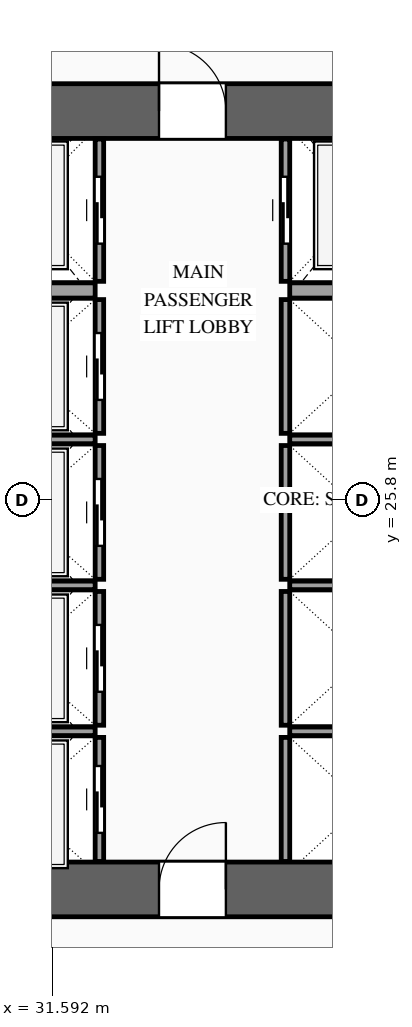
"""IFC4 building model, lengths in metres.
Left out: names, types, materials, properties, quantities, classifications, styles, units other than length and angle.
Written with IfcOpenShell. Run it as: python <this file> out.ifc"""

import sys

from ifc_helpers import new_model, si_unit, direction, frame, frame_2d, origin, place, context, subcontext, project, spatial, rectangle, extrude, source, transform, mapped, element, fill, save


model = new_model("IFC4")
c1 = context("Model", 3, precision=1e-05, world=origin(), true_north=direction((0.0, 1.0)))
c2 = subcontext(c1, "Body", "Model", "MODEL_VIEW")
j1 = project(units=[si_unit("LENGTHUNIT", "METRE"), si_unit("PLANEANGLEUNIT", "RADIAN")], contexts=[c1])
p1 = place(None, origin())
s1 = spatial("IfcSite", under=j1, at=p1, CompositionType="ELEMENT")
p2 = place(p1, origin())
s2 = spatial("IfcBuilding", under=s1, at=p2, CompositionType="ELEMENT")
p3 = place(p2, frame((0.0, 0.0, 64.0)))
s3 = spatial("IfcBuildingStorey", under=s2, at=p3, CompositionType="ELEMENT", Elevation=64.0)
p4 = place(p3, frame((23.35, 19.4, 0.0), z_axis=(0.0, 0.0, 1.0), x_axis=(1.0, 0.0, 0.0)))
e1 = element("IfcWall", 1, at=p4, inside=s3, PredefinedType="SHEAR", context=c2, shape_type="SweptSolid", body=[
    extrude(rectangle(XDim=27.3, YDim=0.9, at=frame_2d((13.65, 0.0))), origin(), (0.0, 0.0, 1.0), 3.6),
])
p5 = place(p4, frame((2.1, 0.0, 0.0)))
e2 = element("IfcOpeningElement", 2, at=p5, cuts=e1, PredefinedType="OPENING", context=c2, shape_type="SweptSolid", body=[
    extrude(rectangle(XDim=1.1, YDim=2.2, at=frame_2d((0.55, 1.1))), frame((0.0, 0.465, 0.0), z_axis=(0.0, -1.0, 0.0), x_axis=(1.0, 0.0, 0.0)), (0.0, 0.0, 1.0), 0.93),
])
p6 = place(p4, frame((10.0, 0.0, 0.0)))
e3 = element("IfcOpeningElement", 3, at=p6, cuts=e1, PredefinedType="OPENING", context=c2, shape_type="SweptSolid", body=[
    extrude(rectangle(XDim=1.1, YDim=2.2, at=frame_2d((0.55, 1.1))), frame((0.0, 0.465, 0.0), z_axis=(0.0, -1.0, 0.0), x_axis=(1.0, 0.0, 0.0)), (0.0, 0.0, 1.0), 0.93),
])
p7 = place(p4, frame((23.2, 0.0, 0.0)))
e4 = element("IfcOpeningElement", 4, at=p7, cuts=e1, PredefinedType="OPENING", context=c2, shape_type="SweptSolid", body=[
    extrude(rectangle(XDim=1.1, YDim=2.2, at=frame_2d((0.55, 1.1))), frame((0.0, 0.465, 0.0), z_axis=(0.0, -1.0, 0.0), x_axis=(1.0, 0.0, 0.0)), (0.0, 0.0, 1.0), 0.93),
])
p8 = place(p4, frame((19.82, 0.0, 0.0)))
e5 = element("IfcOpeningElement", 5, at=p8, cuts=e1, PredefinedType="OPENING", context=c2, shape_type="SweptSolid", body=[
    extrude(rectangle(XDim=0.9, YDim=2.15, at=frame_2d((0.45, 1.075))), frame((0.0, 0.465, 0.0), z_axis=(0.0, -1.0, 0.0), x_axis=(1.0, 0.0, 0.0)), (0.0, 0.0, 1.0), 0.93),
])
p9 = place(p4, frame((18.38, 0.0, 0.0)))
e6 = element("IfcOpeningElement", 6, at=p9, cuts=e1, PredefinedType="OPENING", context=c2, shape_type="SweptSolid", body=[
    extrude(rectangle(XDim=0.9, YDim=2.15, at=frame_2d((0.45, 1.075))), frame((0.0, 0.465, 0.0), z_axis=(0.0, -1.0, 0.0), x_axis=(1.0, 0.0, 0.0)), (0.0, 0.0, 1.0), 0.93),
])
p10 = place(p3, frame((23.35, 32.2, 0.0), z_axis=(0.0, 0.0, 1.0), x_axis=(1.0, 0.0, 0.0)))
e7 = element("IfcWall", 7, at=p10, inside=s3, PredefinedType="SHEAR", context=c2, shape_type="SweptSolid", body=[
    extrude(rectangle(XDim=27.3, YDim=0.9, at=frame_2d((13.65, 0.0))), origin(), (0.0, 0.0, 1.0), 3.6),
])
p11 = place(p10, frame((4.72, 0.0, 0.0)))
e8 = element("IfcOpeningElement", 8, at=p11, cuts=e7, PredefinedType="OPENING", context=c2, shape_type="SweptSolid", body=[
    extrude(rectangle(XDim=0.9, YDim=2.15, at=frame_2d((0.45, 1.075))), frame((0.0, 0.465, 0.0), z_axis=(0.0, -1.0, 0.0), x_axis=(1.0, 0.0, 0.0)), (0.0, 0.0, 1.0), 0.93),
])
p12 = place(p10, frame((10.0, 0.0, 0.0)))
e9 = element("IfcOpeningElement", 9, at=p12, cuts=e7, PredefinedType="OPENING", context=c2, shape_type="SweptSolid", body=[
    extrude(rectangle(XDim=1.1, YDim=2.2, at=frame_2d((0.55, 1.1))), frame((0.0, 0.465, 0.0), z_axis=(0.0, -1.0, 0.0), x_axis=(1.0, 0.0, 0.0)), (0.0, 0.0, 1.0), 0.93),
])
p13 = place(p10, frame((15.85, 0.0, 0.0)))
e10 = element("IfcOpeningElement", 10, at=p13, cuts=e7, PredefinedType="OPENING", context=c2, shape_type="SweptSolid", body=[
    extrude(rectangle(XDim=1.1, YDim=2.2, at=frame_2d((0.55, 1.1))), frame((0.0, 0.465, 0.0), z_axis=(0.0, -1.0, 0.0), x_axis=(1.0, 0.0, 0.0)), (0.0, 0.0, 1.0), 0.93),
])
p14 = place(p10, frame((19.82, 0.0, 0.0)))
e11 = element("IfcOpeningElement", 11, at=p14, cuts=e7, PredefinedType="OPENING", context=c2, shape_type="SweptSolid", body=[
    extrude(rectangle(XDim=0.9, YDim=2.15, at=frame_2d((0.45, 1.075))), frame((0.0, 0.465, 0.0), z_axis=(0.0, -1.0, 0.0), x_axis=(1.0, 0.0, 0.0)), (0.0, 0.0, 1.0), 0.93),
])
p15 = place(p3, frame((32.37, 19.86, 0.0), z_axis=(0.0, 0.0, 1.0), x_axis=(0.0, 1.0, 0.0)))
e12 = element("IfcWall", 12, at=p15, inside=s3, PredefinedType="SOLIDWALL", context=c2, shape_type="SweptSolid", body=[
    extrude(rectangle(XDim=2.04, YDim=0.14, at=frame_2d((1.02, 0.0))), origin(), (0.0, 0.0, 1.0), 3.38),
])
p16 = place(p15, frame((0.47, 0.0, 0.0)))
e13 = element("IfcOpeningElement", 13, at=p16, cuts=e12, PredefinedType="OPENING", context=c2, shape_type="SweptSolid", body=[
    extrude(rectangle(XDim=1.1, YDim=2.2, at=frame_2d((0.55, 1.1))), frame((0.0, 0.085, 0.0), z_axis=(0.0, -1.0, 0.0), x_axis=(1.0, 0.0, 0.0)), (0.0, 0.0, 1.0), 0.17),
])
m1 = source(origin(), c2, "Body", "SweptSolid", [
    extrude(rectangle(XDim=2.5, YDim=0.14, at=frame_2d((1.25, 0.0))), origin(), (0.0, 0.0, 1.0), 3.38),
])
p17 = place(p3, frame((29.8, 22.0, 0.0), z_axis=(0.0, 0.0, 1.0), x_axis=(1.0, 0.0, 0.0)))
e14 = element("IfcWall", 14, at=p17, inside=s3, PredefinedType="SOLIDWALL", context=c2, shape_type="MappedRepresentation", body=[
    mapped(m1, transform((0.0, 0.0, 0.0), scale=1.0)),
])
p18 = place(p3, frame((32.37, 22.1, 0.0), z_axis=(0.0, 0.0, 1.0), x_axis=(0.0, 1.0, 0.0)))
e15 = element("IfcWall", 15, at=p18, inside=s3, PredefinedType="SOLIDWALL", context=c2, shape_type="SweptSolid", body=[
    extrude(rectangle(XDim=2.2, YDim=0.14, at=frame_2d((1.1, 0.0))), origin(), (0.0, 0.0, 1.0), 3.38),
])
p19 = place(p18, frame((0.55, 0.0, 0.0)))
e16 = element("IfcOpeningElement", 16, at=p19, cuts=e15, PredefinedType="OPENING", context=c2, shape_type="SweptSolid", body=[
    extrude(rectangle(XDim=1.1, YDim=2.2, at=frame_2d((0.55, 1.1))), frame((0.0, 0.085, 0.0), z_axis=(0.0, -1.0, 0.0), x_axis=(1.0, 0.0, 0.0)), (0.0, 0.0, 1.0), 0.17),
])
p20 = place(p3, frame((29.8, 24.4, 0.0), z_axis=(0.0, 0.0, 1.0), x_axis=(1.0, 0.0, 0.0)))
e17 = element("IfcWall", 17, at=p20, inside=s3, PredefinedType="SOLIDWALL", context=c2, shape_type="MappedRepresentation", body=[
    mapped(m1, transform((0.0, 0.0, 0.0), scale=1.0)),
])
p21 = place(p3, frame((32.37, 24.5, 0.0), z_axis=(0.0, 0.0, 1.0), x_axis=(0.0, 1.0, 0.0)))
e18 = element("IfcWall", 18, at=p21, inside=s3, PredefinedType="SOLIDWALL", context=c2, shape_type="SweptSolid", body=[
    extrude(rectangle(XDim=2.2, YDim=0.14, at=frame_2d((1.1, 0.0))), origin(), (0.0, 0.0, 1.0), 3.38),
])
p22 = place(p21, frame((0.55, 0.0, 0.0)))
e19 = element("IfcOpeningElement", 19, at=p22, cuts=e18, PredefinedType="OPENING", context=c2, shape_type="SweptSolid", body=[
    extrude(rectangle(XDim=1.1, YDim=2.2, at=frame_2d((0.55, 1.1))), frame((0.0, 0.085, 0.0), z_axis=(0.0, -1.0, 0.0), x_axis=(1.0, 0.0, 0.0)), (0.0, 0.0, 1.0), 0.17),
])
p23 = place(p3, frame((29.8, 26.8, 0.0), z_axis=(0.0, 0.0, 1.0), x_axis=(1.0, 0.0, 0.0)))
e20 = element("IfcWall", 20, at=p23, inside=s3, PredefinedType="SOLIDWALL", context=c2, shape_type="MappedRepresentation", body=[
    mapped(m1, transform((0.0, 0.0, 0.0), scale=1.0)),
])
p24 = place(p3, frame((32.37, 26.9, 0.0), z_axis=(0.0, 0.0, 1.0), x_axis=(0.0, 1.0, 0.0)))
e21 = element("IfcWall", 21, at=p24, inside=s3, PredefinedType="SOLIDWALL", context=c2, shape_type="SweptSolid", body=[
    extrude(rectangle(XDim=2.2, YDim=0.14, at=frame_2d((1.1, 0.0))), origin(), (0.0, 0.0, 1.0), 3.38),
])
p25 = place(p24, frame((0.55, 0.0, 0.0)))
e22 = element("IfcOpeningElement", 22, at=p25, cuts=e21, PredefinedType="OPENING", context=c2, shape_type="SweptSolid", body=[
    extrude(rectangle(XDim=1.1, YDim=2.2, at=frame_2d((0.55, 1.1))), frame((0.0, 0.085, 0.0), z_axis=(0.0, -1.0, 0.0), x_axis=(1.0, 0.0, 0.0)), (0.0, 0.0, 1.0), 0.17),
])
p26 = place(p3, frame((32.37, 29.4, 0.0), z_axis=(0.0, 0.0, 1.0), x_axis=(0.0, 1.0, 0.0)))
e23 = element("IfcWall", 23, at=p26, inside=s3, PredefinedType="SOLIDWALL", context=c2, shape_type="SweptSolid", body=[
    extrude(rectangle(XDim=2.34, YDim=0.14, at=frame_2d((1.17, 0.0))), origin(), (0.0, 0.0, 1.0), 3.38),
])
p27 = place(p26, frame((0.62, 0.0, 0.0)))
e24 = element("IfcOpeningElement", 24, at=p27, cuts=e23, PredefinedType="OPENING", context=c2, shape_type="SweptSolid", body=[
    extrude(rectangle(XDim=1.1, YDim=2.2, at=frame_2d((0.55, 1.1))), frame((0.0, 0.085, 0.0), z_axis=(0.0, -1.0, 0.0), x_axis=(1.0, 0.0, 0.0)), (0.0, 0.0, 1.0), 0.17),
])
m2 = source(origin(), c2, "Body", "SweptSolid", [
    extrude(rectangle(XDim=2.5, YDim=0.25, at=frame_2d((1.25, 0.0))), origin(), (0.0, 0.0, 1.0), 3.38),
])
p28 = place(p3, frame((29.8, 29.25, 0.0), z_axis=(0.0, 0.0, 1.0), x_axis=(1.0, 0.0, 0.0)))
e25 = element("IfcWall", 25, at=p28, inside=s3, PredefinedType="SOLIDWALL", context=c2, shape_type="MappedRepresentation", body=[
    mapped(m2, transform((0.0, 0.0, 0.0), scale=1.0)),
])
m3 = source(origin(), c2, "Body", "SweptSolid", [
    extrude(rectangle(XDim=2.04, YDim=0.14, at=frame_2d((1.02, 0.0))), origin(), (0.0, 0.0, 1.0), 3.38),
])
p29 = place(p3, frame((35.43, 19.86, 0.0), z_axis=(0.0, 0.0, 1.0), x_axis=(0.0, 1.0, 0.0)))
e26 = element("IfcWall", 26, at=p29, inside=s3, PredefinedType="SOLIDWALL", context=c2, shape_type="MappedRepresentation", body=[
    mapped(m3, transform((0.0, 0.0, 0.0), scale=1.0)),
])
m4 = source(origin(), c2, "Body", "SweptSolid", [
    extrude(rectangle(XDim=2.4, YDim=0.14, at=frame_2d((1.2, 0.0))), origin(), (0.0, 0.0, 1.0), 3.38),
])
p30 = place(p3, frame((35.5, 22.0, 0.0), z_axis=(0.0, 0.0, 1.0), x_axis=(1.0, 0.0, 0.0)))
e27 = element("IfcWall", 27, at=p30, inside=s3, PredefinedType="SOLIDWALL", context=c2, shape_type="MappedRepresentation", body=[
    mapped(m4, transform((0.0, 0.0, 0.0), scale=1.0)),
])
m5 = source(origin(), c2, "Body", "SweptSolid", [
    extrude(rectangle(XDim=2.2, YDim=0.14, at=frame_2d((1.1, 0.0))), origin(), (0.0, 0.0, 1.0), 3.38),
])
p31 = place(p3, frame((35.43, 22.1, 0.0), z_axis=(0.0, 0.0, 1.0), x_axis=(0.0, 1.0, 0.0)))
e28 = element("IfcWall", 28, at=p31, inside=s3, PredefinedType="SOLIDWALL", context=c2, shape_type="MappedRepresentation", body=[
    mapped(m5, transform((0.0, 0.0, 0.0), scale=1.0)),
])
p32 = place(p3, frame((35.5, 24.4, 0.0), z_axis=(0.0, 0.0, 1.0), x_axis=(1.0, 0.0, 0.0)))
e29 = element("IfcWall", 29, at=p32, inside=s3, PredefinedType="SOLIDWALL", context=c2, shape_type="MappedRepresentation", body=[
    mapped(m4, transform((0.0, 0.0, 0.0), scale=1.0)),
])
p33 = place(p3, frame((35.43, 24.5, 0.0), z_axis=(0.0, 0.0, 1.0), x_axis=(0.0, 1.0, 0.0)))
e30 = element("IfcWall", 30, at=p33, inside=s3, PredefinedType="SOLIDWALL", context=c2, shape_type="MappedRepresentation", body=[
    mapped(m5, transform((0.0, 0.0, 0.0), scale=1.0)),
])
p34 = place(p3, frame((35.5, 26.8, 0.0), z_axis=(0.0, 0.0, 1.0), x_axis=(1.0, 0.0, 0.0)))
e31 = element("IfcWall", 31, at=p34, inside=s3, PredefinedType="SOLIDWALL", context=c2, shape_type="MappedRepresentation", body=[
    mapped(m4, transform((0.0, 0.0, 0.0), scale=1.0)),
])
m6 = source(origin(), c2, "Body", "SweptSolid", [
    extrude(rectangle(XDim=2.2, YDim=0.14, at=frame_2d((1.1, 0.0))), origin(), (0.0, 0.0, 1.0), 3.38),
])
p35 = place(p3, frame((35.43, 26.9, 0.0), z_axis=(0.0, 0.0, 1.0), x_axis=(0.0, 1.0, 0.0)))
e32 = element("IfcWall", 32, at=p35, inside=s3, PredefinedType="SOLIDWALL", context=c2, shape_type="MappedRepresentation", body=[
    mapped(m6, transform((0.0, 0.0, 0.0), scale=1.0)),
])
p36 = place(p3, frame((35.43, 29.4, 0.0), z_axis=(0.0, 0.0, 1.0), x_axis=(0.0, 1.0, 0.0)))
e33 = element("IfcWall", 33, at=p36, inside=s3, PredefinedType="SOLIDWALL", context=c2, shape_type="SweptSolid", body=[
    extrude(rectangle(XDim=2.34, YDim=0.14, at=frame_2d((1.17, 0.0))), origin(), (0.0, 0.0, 1.0), 3.38),
])
p37 = place(p36, frame((0.62, 0.0, 0.0)))
e34 = element("IfcOpeningElement", 34, at=p37, cuts=e33, PredefinedType="OPENING", context=c2, shape_type="SweptSolid", body=[
    extrude(rectangle(XDim=1.1, YDim=2.2, at=frame_2d((0.55, 1.1))), frame((0.0, 0.085, 0.0), z_axis=(0.0, -1.0, 0.0), x_axis=(1.0, 0.0, 0.0)), (0.0, 0.0, 1.0), 0.17),
])
m7 = source(origin(), c2, "Body", "SweptSolid", [
    extrude(rectangle(XDim=2.4, YDim=0.25, at=frame_2d((1.2, 0.0))), origin(), (0.0, 0.0, 1.0), 3.38),
])
p38 = place(p3, frame((35.5, 29.25, 0.0), z_axis=(0.0, 0.0, 1.0), x_axis=(1.0, 0.0, 0.0)))
e35 = element("IfcWall", 35, at=p38, inside=s3, PredefinedType="SOLIDWALL", context=c2, shape_type="MappedRepresentation", body=[
    mapped(m7, transform((0.0, 0.0, 0.0), scale=1.0)),
])
m8 = source(origin(), c2, "Body", "SweptSolid", [
    extrude(rectangle(XDim=1.1, YDim=2.2, at=frame_2d((0.55, 1.1))), frame((0.0, 0.025, 0.0), z_axis=(0.0, -1.0, 0.0), x_axis=(1.0, 0.0, 0.0)), (0.0, 0.0, 1.0), 0.05),
])
p39 = place(p16, origin())
e36 = element("IfcDoor", 36, at=p39, inside=s3, OperationType="SLIDING_TO_LEFT", PredefinedType="DOOR", context=c2, shape_type="MappedRepresentation", body=[
    mapped(m8, transform((0.0, 0.0, 0.0), scale=1.0)),
])
fill(e13, e36)
p40 = place(p19, origin())
e37 = element("IfcDoor", 37, at=p40, inside=s3, OperationType="SLIDING_TO_RIGHT", PredefinedType="DOOR", context=c2, shape_type="MappedRepresentation", body=[
    mapped(m8, transform((0.0, 0.0, 0.0), scale=1.0)),
])
fill(e16, e37)
p41 = place(p22, origin())
e38 = element("IfcDoor", 38, at=p41, inside=s3, OperationType="SLIDING_TO_LEFT", PredefinedType="DOOR", context=c2, shape_type="MappedRepresentation", body=[
    mapped(m8, transform((0.0, 0.0, 0.0), scale=1.0)),
])
fill(e19, e38)
p42 = place(p25, origin())
e39 = element("IfcDoor", 39, at=p42, inside=s3, OperationType="SLIDING_TO_RIGHT", PredefinedType="DOOR", context=c2, shape_type="MappedRepresentation", body=[
    mapped(m8, transform((0.0, 0.0, 0.0), scale=1.0)),
])
fill(e22, e39)
p43 = place(p27, origin())
e40 = element("IfcDoor", 40, at=p43, inside=s3, OperationType="SLIDING_TO_LEFT", PredefinedType="DOOR", context=c2, shape_type="MappedRepresentation", body=[
    mapped(m8, transform((0.0, 0.0, 0.0), scale=1.0)),
])
fill(e24, e40)
p44 = place(p37, origin())
e41 = element("IfcDoor", 41, at=p44, inside=s3, OperationType="SLIDING_TO_RIGHT", PredefinedType="DOOR", context=c2, shape_type="MappedRepresentation", body=[
    mapped(m8, transform((0.0, 0.0, 0.0), scale=1.0)),
])
fill(e34, e41)
m9 = source(origin(), c2, "Body", "SweptSolid", [
    extrude(rectangle(XDim=1.1, YDim=2.2, at=frame_2d((0.55, 1.1))), frame((0.0, 0.025, 0.0), z_axis=(0.0, -1.0, 0.0), x_axis=(1.0, 0.0, 0.0)), (0.0, 0.0, 1.0), 0.05),
])
p45 = place(p6, origin())
e42 = element("IfcDoor", 42, at=p45, inside=s3, OperationType="SINGLE_SWING_RIGHT", PredefinedType="DOOR", context=c2, shape_type="MappedRepresentation", body=[
    mapped(m9, transform((0.0, 0.0, 0.0), scale=1.0)),
])
fill(e3, e42)
p46 = place(p12, origin())
e43 = element("IfcDoor", 43, at=p46, inside=s3, OperationType="SINGLE_SWING_LEFT", PredefinedType="DOOR", context=c2, shape_type="MappedRepresentation", body=[
    mapped(m9, transform((0.0, 0.0, 0.0), scale=1.0)),
])
fill(e9, e43)
save(model, sys.argv[1])
